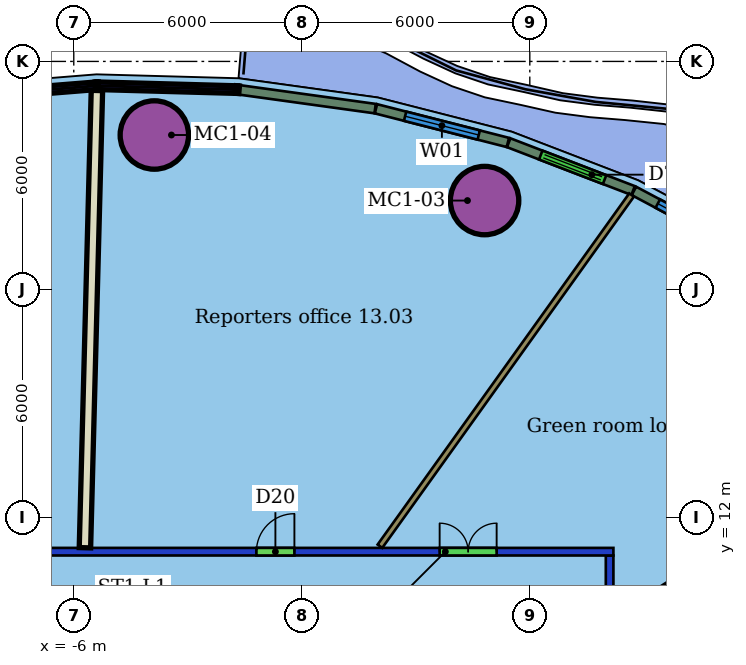
"""IFC4 building model, lengths in metres.
Left out: names, types, materials, properties, quantities, classifications, styles, units other than length and angle.
Written with IfcOpenShell. Run it as: python <this file> out.ifc"""

import sys

from ifc_helpers import new_model, si_unit, direction, frame, frame_2d, origin, origin_2d, place, context, subcontext, project, spatial, rectangle, hollow_circle, extrude, element, fill, save


model = new_model("IFC4")
c1 = context("Model", 3, precision=1e-05, world=origin(), true_north=direction((0.0, 1.0)))
c2 = subcontext(c1, "Body", "Model", "MODEL_VIEW")
j1 = project(units=[si_unit("LENGTHUNIT", "METRE"), si_unit("PLANEANGLEUNIT", "RADIAN")], contexts=[c1])
p1 = place(None, origin())
s1 = spatial("IfcSite", under=j1, at=p1, CompositionType="ELEMENT")
p2 = place(p1, origin())
s2 = spatial("IfcBuilding", under=s1, at=p2, CompositionType="ELEMENT")
p3 = place(p2, frame((0.0, 0.0, 65.6)))
s3 = spatial("IfcBuildingStorey", under=s2, at=p3, CompositionType="ELEMENT", Elevation=65.6)
for number, where, z_axis, x_axis in (
    (1, (4.81, 20.339, 0.0), (0.0, 0.0, 1.0), (1.0, 0.0, 0.0)),
    (2, (-3.879, 22.064, 0.0), (0.0, 0.0, 1.0), (1.0, 0.0, 0.0)),
):
    element("IfcColumn", number, at=place(p3, frame(where, z_axis=z_axis, x_axis=x_axis)), inside=s3, PredefinedType="COLUMN", context=c2, shape_type="SweptSolid", body=[
        extrude(hollow_circle(Radius=0.9, WallThickness=0.06, at=origin_2d()), origin(), (0.0, 0.0, 1.0), 3.55),
    ])
p4 = place(p3, frame((-20.2, 11.1, 0.0), z_axis=(0.0, 0.0, 1.0), x_axis=(1.0, 0.0, 0.0)))
e3 = element("IfcWall", 3, at=p4, inside=s3, PredefinedType="PARTITIONING", context=c2, shape_type="SweptSolid", body=[
    extrude(rectangle(XDim=28.4, YDim=0.2, at=frame_2d((14.2, 0.0))), origin(), (0.0, 0.0, 1.0), 2.85),
])
p5 = place(p4, frame((23.828, 0.0, 0.0)))
e4 = element("IfcOpeningElement", 4, at=p5, cuts=e3, PredefinedType="OPENING", context=c2, shape_type="SweptSolid", body=[
    extrude(rectangle(XDim=1.5, YDim=2.1, at=frame_2d((0.75, 1.05))), frame((0.0, 0.11, 0.0), z_axis=(0.0, -1.0, 0.0), x_axis=(1.0, 0.0, 0.0)), (0.0, 0.0, 1.0), 0.22),
])
p6 = place(p4, frame((19.006, 0.0, 0.0)))
e5 = element("IfcOpeningElement", 5, at=p6, cuts=e3, PredefinedType="OPENING", context=c2, shape_type="SweptSolid", body=[
    extrude(rectangle(XDim=1.0, YDim=2.1, at=frame_2d((0.5, 1.05))), frame((0.0, 0.11, 0.0), z_axis=(0.0, -1.0, 0.0), x_axis=(1.0, 0.0, 0.0)), (0.0, 0.0, 1.0), 0.22),
])
p7 = place(p4, frame((10.323, 0.0, 0.0)))
e6 = element("IfcOpeningElement", 6, at=p7, cuts=e3, PredefinedType="OPENING", context=c2, shape_type="SweptSolid", body=[
    extrude(rectangle(XDim=1.2, YDim=2.1, at=frame_2d((0.6, 1.05))), frame((0.0, 0.11, 0.0), z_axis=(0.0, -1.0, 0.0), x_axis=(1.0, 0.0, 0.0)), (0.0, 0.0, 1.0), 0.22),
])
p8 = place(p4, frame((6.36, 0.0, 0.0)))
e7 = element("IfcOpeningElement", 7, at=p8, cuts=e3, PredefinedType="OPENING", context=c2, shape_type="SweptSolid", body=[
    extrude(rectangle(XDim=1.0, YDim=2.1, at=frame_2d((0.5, 1.05))), frame((0.0, 0.11, 0.0), z_axis=(0.0, -1.0, 0.0), x_axis=(1.0, 0.0, 0.0)), (0.0, 0.0, 1.0), 0.22),
])
p9 = place(p3, frame((8.1, 11.0, 0.0), z_axis=(0.0, 0.0, 1.0), x_axis=(0.0, -1.0, 0.0)))
e8 = element("IfcWall", 8, at=p9, inside=s3, PredefinedType="PARTITIONING", context=c2, shape_type="SweptSolid", body=[
    extrude(rectangle(XDim=22.0, YDim=0.2, at=frame_2d((11.0, 0.0))), origin(), (0.0, 0.0, 1.0), 2.85),
])
p10 = place(p9, frame((5.939, 0.0, 0.0)))
e9 = element("IfcOpeningElement", 9, at=p10, cuts=e8, PredefinedType="OPENING", context=c2, shape_type="SweptSolid", body=[
    extrude(rectangle(XDim=1.1, YDim=2.1, at=frame_2d((0.55, 1.05))), frame((0.0, 0.11, 0.0), z_axis=(0.0, -1.0, 0.0), x_axis=(1.0, 0.0, 0.0)), (0.0, 0.0, 1.0), 0.22),
])
p11 = place(p9, frame((12.727, 0.0, 0.0)))
e10 = element("IfcOpeningElement", 10, at=p11, cuts=e8, PredefinedType="OPENING", context=c2, shape_type="SweptSolid", body=[
    extrude(rectangle(XDim=0.9, YDim=2.1, at=frame_2d((0.45, 1.05))), frame((0.0, 0.11, 0.0), z_axis=(0.0, -1.0, 0.0), x_axis=(1.0, 0.0, 0.0)), (0.0, 0.0, 1.0), 0.22),
])
p12 = place(p3, frame((16.8, 14.719, 0.0), z_axis=(0.0, 0.0, 1.0), x_axis=(-0.840135613628, -0.542376392106, 0.0)))
e11 = element("IfcWall", 11, at=p12, inside=s3, PredefinedType="PARTITIONING", context=c2, shape_type="SweptSolid", body=[
    extrude(rectangle(XDim=10.139, YDim=0.3, at=frame_2d((5.07, 0.0))), origin(), (0.0, 0.0, 1.0), 3.55),
])
p13 = place(p3, frame((8.678, 20.485, 0.0), z_axis=(0.0, 0.0, 1.0), x_axis=(-0.582440193454, -0.812873557849, 0.0)))
e12 = element("IfcWall", 12, at=p13, inside=s3, PredefinedType="PARTITIONING", context=c2, shape_type="SweptSolid", body=[
    extrude(rectangle(XDim=11.368, YDim=0.15, at=frame_2d((5.684, 0.0))), origin(), (0.0, 0.0, 1.0), 3.55),
])
p14 = place(p3, frame((-5.391, 23.235, 0.0), z_axis=(0.0, 0.0, 1.0), x_axis=(-0.026207995229, -0.999656511501, 0.0)))
e13 = element("IfcWall", 13, at=p14, inside=s3, PredefinedType="PARTITIONING", context=c2, shape_type="SweptSolid", body=[
    extrude(rectangle(XDim=12.036, YDim=0.3, at=frame_2d((6.018, 0.0))), origin(), (0.0, 0.0, 1.0), 3.55),
])
p15 = place(p3, frame((11.761, 18.985, 0.0), z_axis=(0.0, 0.0, 1.0), x_axis=(-0.882781118704, 0.469784521308, 0.0)))
e14 = element("IfcWall", 14, at=p15, inside=s3, PredefinedType="SOLIDWALL", context=c2, shape_type="SweptSolid", body=[
    extrude(rectangle(XDim=3.422, YDim=0.25, at=frame_2d((1.711, 0.0))), origin(), (0.0, 0.0, 1.0), 3.15),
])
p16 = place(p15, frame((0.711, 0.0, 0.8)))
e15 = element("IfcOpeningElement", 15, at=p16, cuts=e14, PredefinedType="OPENING", context=c2, shape_type="SweptSolid", body=[
    extrude(rectangle(XDim=2.0, YDim=2.2, at=frame_2d((1.0, 1.1))), frame((0.0, 0.135, 0.0), z_axis=(0.0, -1.0, 0.0), x_axis=(1.0, 0.0, 0.0)), (0.0, 0.0, 1.0), 0.27),
])
p17 = place(p3, frame((8.719, 20.603, 0.0), z_axis=(0.0, 0.0, 1.0), x_axis=(-0.933440649203, 0.358731869808, 0.0)))
e16 = element("IfcWall", 16, at=p17, inside=s3, PredefinedType="SOLIDWALL", context=c2, shape_type="SweptSolid", body=[
    extrude(rectangle(XDim=3.508, YDim=0.25, at=frame_2d((1.754, 0.0))), origin(), (0.0, 0.0, 1.0), 3.15),
])
p18 = place(p17, frame((0.804, 0.0, 0.0)))
e17 = element("IfcOpeningElement", 17, at=p18, cuts=e16, PredefinedType="OPENING", context=c2, shape_type="SweptSolid", body=[
    extrude(rectangle(XDim=1.8, YDim=2.4, at=frame_2d((0.9, 1.2))), frame((0.0, 0.135, 0.0), z_axis=(0.0, -1.0, 0.0), x_axis=(1.0, 0.0, 0.0)), (0.0, 0.0, 1.0), 0.27),
])
p19 = place(p3, frame((5.423, 21.868, 0.0), z_axis=(0.0, 0.0, 1.0), x_axis=(-0.968907631907, 0.24742271689, 0.0)))
e18 = element("IfcWall", 18, at=p19, inside=s3, PredefinedType="SOLIDWALL", context=c2, shape_type="SweptSolid", body=[
    extrude(rectangle(XDim=3.583, YDim=0.25, at=frame_2d((1.792, 0.0))), origin(), (0.0, 0.0, 1.0), 3.15),
])
p20 = place(p19, frame((0.791, 0.0, 0.8)))
e19 = element("IfcOpeningElement", 19, at=p20, cuts=e18, PredefinedType="OPENING", context=c2, shape_type="SweptSolid", body=[
    extrude(rectangle(XDim=2.0, YDim=2.2, at=frame_2d((1.0, 1.1))), frame((0.0, 0.135, 0.0), z_axis=(0.0, -1.0, 0.0), x_axis=(1.0, 0.0, 0.0)), (0.0, 0.0, 1.0), 0.27),
])
p21 = place(p3, frame((1.93, 22.758, 0.0), z_axis=(0.0, 0.0, 1.0), x_axis=(-0.990592925524, 0.136841718429, 0.0)))
e20 = element("IfcWall", 20, at=p21, inside=s3, PredefinedType="SOLIDWALL", context=c2, shape_type="SweptSolid", body=[
    extrude(rectangle(XDim=3.599, YDim=0.25, at=frame_2d((1.799, 0.0))), origin(), (0.0, 0.0, 1.0), 3.15),
])
p22 = place(p5, origin())
e21 = element("IfcDoor", 21, at=p22, inside=s3, OperationType="DOUBLE_DOOR_SINGLE_SWING", PredefinedType="DOOR", context=c2, shape_type="SweptSolid", body=[
    extrude(rectangle(XDim=1.5, YDim=2.1, at=frame_2d((0.75, 1.05))), frame((0.0, 0.025, 0.0), z_axis=(0.0, -1.0, 0.0), x_axis=(1.0, 0.0, 0.0)), (0.0, 0.0, 1.0), 0.05),
])
fill(e4, e21)
p23 = place(p6, origin())
e22 = element("IfcDoor", 22, at=p23, inside=s3, OperationType="SINGLE_SWING_RIGHT", PredefinedType="DOOR", context=c2, shape_type="SweptSolid", body=[
    extrude(rectangle(XDim=1.0, YDim=2.1, at=frame_2d((0.5, 1.05))), frame((0.0, 0.025, 0.0), z_axis=(0.0, -1.0, 0.0), x_axis=(1.0, 0.0, 0.0)), (0.0, 0.0, 1.0), 0.05),
])
fill(e5, e22)
p24 = place(p16, origin())
e23 = element("IfcWindow", 23, at=p24, inside=s3, PartitioningType="SINGLE_PANEL", PredefinedType="WINDOW", context=c2, shape_type="SweptSolid", body=[
    extrude(rectangle(XDim=2.0, YDim=2.2, at=frame_2d((1.0, 1.1))), frame((0.0, 0.03, 0.0), z_axis=(0.0, -1.0, 0.0), x_axis=(1.0, 0.0, 0.0)), (0.0, 0.0, 1.0), 0.06),
])
fill(e15, e23)
p25 = place(p18, origin())
e24 = element("IfcDoor", 24, at=p25, inside=s3, OperationType="DOUBLE_DOOR_SLIDING", PredefinedType="DOOR", context=c2, shape_type="SweptSolid", body=[
    extrude(rectangle(XDim=1.8, YDim=2.4, at=frame_2d((0.9, 1.2))), frame((0.0, 0.025, 0.0), z_axis=(0.0, -1.0, 0.0), x_axis=(1.0, 0.0, 0.0)), (0.0, 0.0, 1.0), 0.05),
])
fill(e17, e24)
p26 = place(p20, origin())
e25 = element("IfcWindow", 25, at=p26, inside=s3, PartitioningType="SINGLE_PANEL", PredefinedType="WINDOW", context=c2, shape_type="SweptSolid", body=[
    extrude(rectangle(XDim=2.0, YDim=2.2, at=frame_2d((1.0, 1.1))), frame((0.0, 0.03, 0.0), z_axis=(0.0, -1.0, 0.0), x_axis=(1.0, 0.0, 0.0)), (0.0, 0.0, 1.0), 0.06),
])
fill(e19, e25)
save(model, sys.argv[1])
